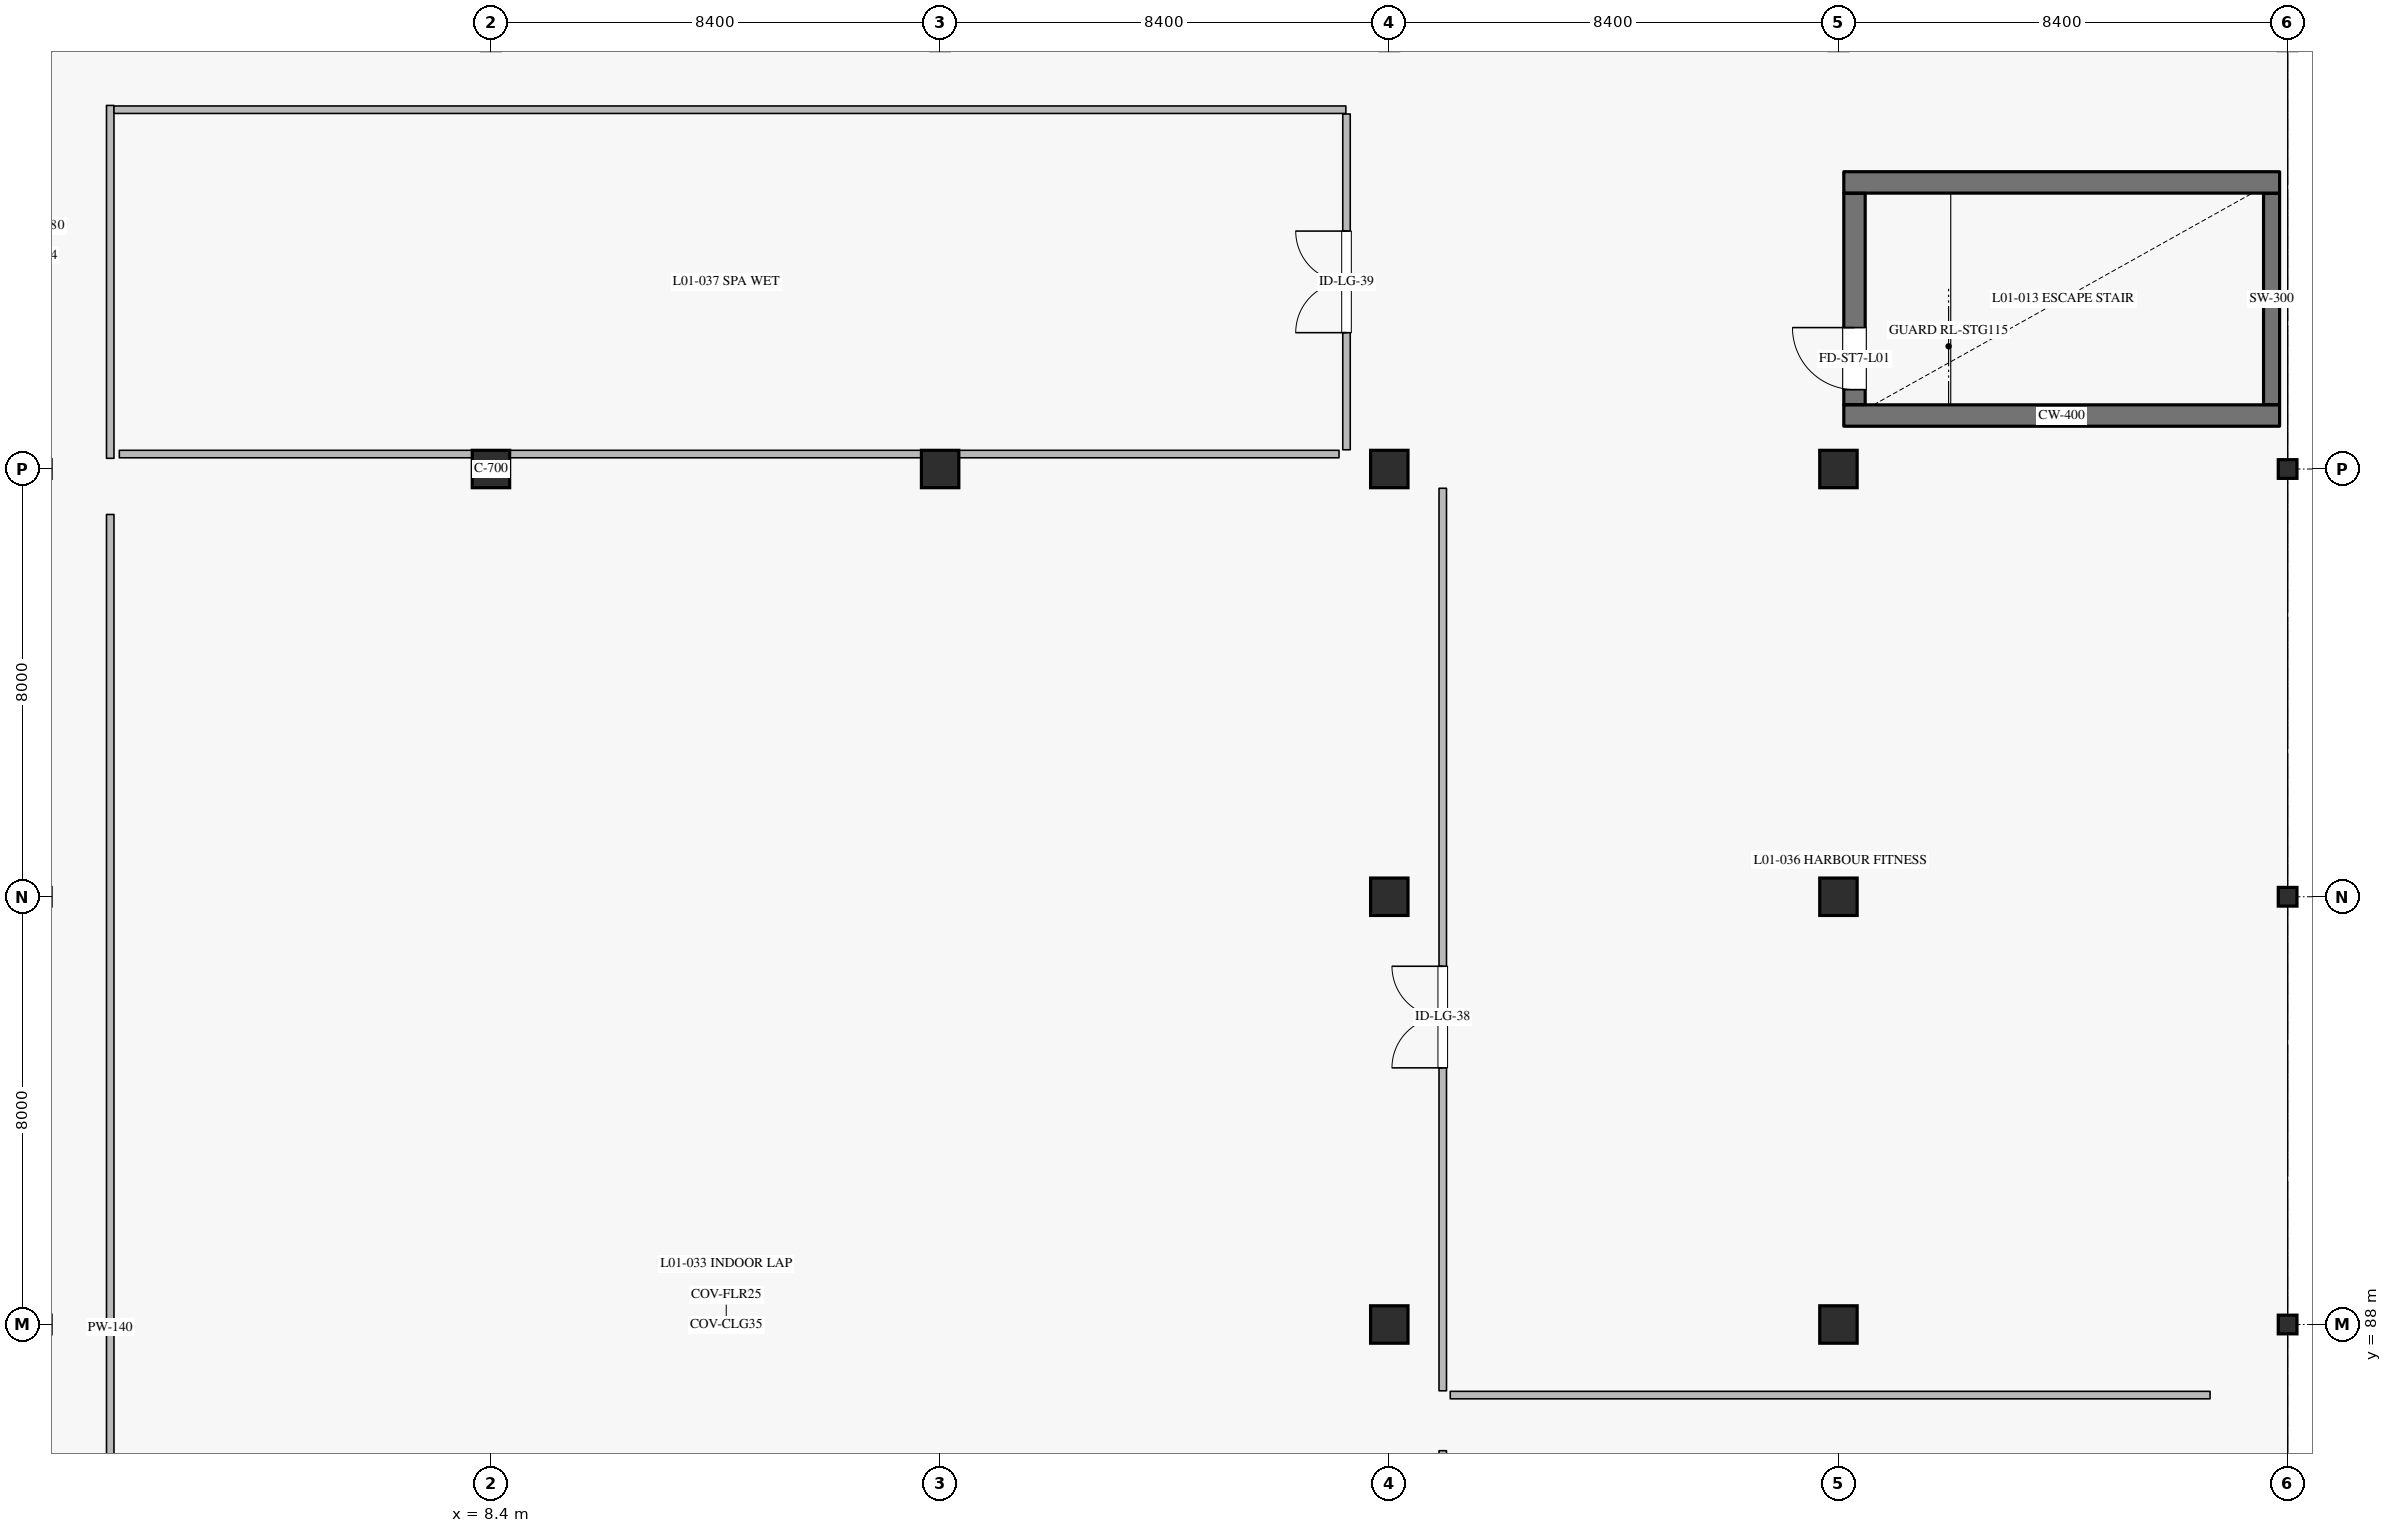
"""IFC4 building model, lengths in metres.
Left out: names, types, materials, properties, quantities, classifications, styles, units other than length and angle.
Written with IfcOpenShell. Run it as: python <this file> out.ifc"""

import sys

from ifc_helpers import new_model, si_unit, direction, frame, frame_2d, origin, origin_2d, place, context, subcontext, project, spatial, rectangle, hollow_rectangle, extrude, element, fill, save


model = new_model("IFC4")
c1 = context("Model", 3, precision=1e-05, world=origin(), true_north=direction((0.0, 1.0)))
c2 = subcontext(c1, "Body", "Model", "MODEL_VIEW")
j1 = project(units=[si_unit("LENGTHUNIT", "METRE"), si_unit("PLANEANGLEUNIT", "RADIAN")], contexts=[c1])
p1 = place(None, origin())
s1 = spatial("IfcSite", under=j1, at=p1, CompositionType="ELEMENT")
p2 = place(p1, origin())
s2 = spatial("IfcBuilding", under=s1, at=p2, CompositionType="ELEMENT")
p3 = place(p2, frame((0.0, 0.0, 6.0)))
s3 = spatial("IfcBuildingStorey", under=s2, at=p3, CompositionType="ELEMENT", Elevation=6.0)
for number, where, z_axis, x_axis in (
    (1, (8.4, 104.0, 0.0), (0.0, 0.0, 1.0), (1.0, 0.0, 0.0)),
    (2, (16.8, 104.0, 0.0), (0.0, 0.0, 1.0), (1.0, 0.0, 0.0)),
    (3, (25.2, 88.0, 0.0), (0.0, 0.0, 1.0), (1.0, 0.0, 0.0)),
    (4, (25.2, 96.0, 0.0), (0.0, 0.0, 1.0), (1.0, 0.0, 0.0)),
    (5, (25.2, 104.0, 0.0), (0.0, 0.0, 1.0), (1.0, 0.0, 0.0)),
    (6, (33.6, 88.0, 0.0), (0.0, 0.0, 1.0), (1.0, 0.0, 0.0)),
    (7, (33.6, 96.0, 0.0), (0.0, 0.0, 1.0), (1.0, 0.0, 0.0)),
    (8, (33.6, 104.0, 0.0), (0.0, 0.0, 1.0), (1.0, 0.0, 0.0)),
):
    element("IfcColumn", number, at=place(p3, frame(where, z_axis=z_axis, x_axis=x_axis)), inside=s3, PredefinedType="COLUMN", context=c2, shape_type="SweptSolid", body=[
        extrude(rectangle(XDim=0.7, YDim=0.7, at=origin_2d()), origin(), (0.0, 0.0, 1.0), 5.4),
    ])
for number, where, z_axis, x_axis in (
    (9, (42.0, 88.0, 0.0), (0.0, 0.0, 1.0), (1.0, 0.0, 0.0)),
    (10, (42.0, 96.0, 0.0), (0.0, 0.0, 1.0), (1.0, 0.0, 0.0)),
    (11, (42.0, 104.0, 0.0), (0.0, 0.0, 1.0), (1.0, 0.0, 0.0)),
):
    element("IfcColumn", number, at=place(p3, frame(where, z_axis=z_axis, x_axis=x_axis)), inside=s3, PredefinedType="COLUMN", context=c2, shape_type="SweptSolid", body=[
        extrude(hollow_rectangle(XDim=0.35, YDim=0.35, WallThickness=0.016, at=origin_2d()), origin(), (0.0, 0.0, 1.0), 5.4),
    ])
p4 = place(p3, frame((33.7, 105.0, 0.0), z_axis=(0.0, 0.0, 1.0), x_axis=(1.0, 0.0, 0.0)))
e12 = element("IfcWall", 12, at=p4, inside=s3, PredefinedType="SHEAR", context=c2, shape_type="SweptSolid", body=[
    extrude(rectangle(XDim=8.15, YDim=0.4, at=frame_2d((4.075, 0.0))), origin(), (0.0, 0.0, 1.0), 5.045),
])
p5 = place(p3, frame((41.7, 105.205, 0.0), z_axis=(0.0, 0.0, 1.0), x_axis=(0.0, 1.0, 0.0)))
e13 = element("IfcWall", 13, at=p5, inside=s3, PredefinedType="SHEAR", context=c2, shape_type="SweptSolid", body=[
    extrude(rectangle(XDim=3.95, YDim=0.3, at=frame_2d((1.975, 0.0))), origin(), (0.0, 0.0, 1.0), 5.045),
])
p6 = place(p3, frame((33.7, 109.36, 0.0), z_axis=(0.0, 0.0, 1.0), x_axis=(1.0, 0.0, 0.0)))
e14 = element("IfcWall", 14, at=p6, inside=s3, PredefinedType="SHEAR", context=c2, shape_type="SweptSolid", body=[
    extrude(rectangle(XDim=8.15, YDim=0.4, at=frame_2d((4.075, 0.0))), origin(), (0.0, 0.0, 1.0), 5.045),
])
p7 = place(p3, frame((33.9, 105.205, 0.0), z_axis=(0.0, 0.0, 1.0), x_axis=(0.0, 1.0, 0.0)))
e15 = element("IfcWall", 15, at=p7, inside=s3, PredefinedType="SHEAR", context=c2, shape_type="SweptSolid", body=[
    extrude(rectangle(XDim=3.95, YDim=0.4, at=frame_2d((1.975, 0.0))), origin(), (0.0, 0.0, 1.0), 5.045),
])
p8 = place(p7, frame((0.28, 0.0, 0.0)))
e16 = element("IfcOpeningElement", 16, at=p8, cuts=e15, PredefinedType="OPENING", context=c2, shape_type="SweptSolid", body=[
    extrude(rectangle(XDim=1.16, YDim=2.2, at=frame_2d((0.58, 1.1))), frame((0.0, 0.21, 0.0), z_axis=(0.0, -1.0, 0.0), x_axis=(1.0, 0.0, 0.0)), (0.0, 0.0, 1.0), 0.42),
])
p9 = place(p3, frame((1.28, 72.74, 0.0), z_axis=(0.0, 0.0, 1.0), x_axis=(0.0, 1.0, 0.0)))
e17 = element("IfcWall", 17, at=p9, inside=s3, PredefinedType="PARTITIONING", context=c2, shape_type="SweptSolid", body=[
    extrude(rectangle(XDim=30.41, YDim=0.14, at=frame_2d((15.205, 0.0))), origin(), (0.0, 0.0, 1.0), 5.045),
])
p10 = place(p3, frame((26.2, 65.16, 0.0), z_axis=(0.0, 0.0, 1.0), x_axis=(0.0, 1.0, 0.0)))
e18 = element("IfcWall", 18, at=p10, inside=s3, PredefinedType="PARTITIONING", context=c2, shape_type="SweptSolid", body=[
    extrude(rectangle(XDim=20.48, YDim=0.14, at=frame_2d((10.24, 0.0))), origin(), (0.0, 0.0, 1.0), 5.045),
])
p11 = place(p10, frame((9.29, 0.0, 0.0)))
e19 = element("IfcOpeningElement", 19, at=p11, cuts=e18, PredefinedType="OPENING", context=c2, shape_type="SweptSolid", body=[
    extrude(rectangle(XDim=1.9, YDim=2.4, at=frame_2d((0.95, 1.2))), frame((0.0, 0.08, 0.0), z_axis=(0.0, -1.0, 0.0), x_axis=(1.0, 0.0, 0.0)), (0.0, 0.0, 1.0), 0.16),
])
p12 = place(p3, frame((26.2, 86.76, 0.0), z_axis=(0.0, 0.0, 1.0), x_axis=(0.0, 1.0, 0.0)))
e20 = element("IfcWall", 20, at=p12, inside=s3, PredefinedType="PARTITIONING", context=c2, shape_type="SweptSolid", body=[
    extrude(rectangle(XDim=16.88, YDim=0.14, at=frame_2d((8.44, 0.0))), origin(), (0.0, 0.0, 1.0), 5.045),
])
p13 = place(p12, frame((6.04, 0.0, 0.0)))
e21 = element("IfcOpeningElement", 21, at=p13, cuts=e20, PredefinedType="OPENING", context=c2, shape_type="SweptSolid", body=[
    extrude(rectangle(XDim=1.9, YDim=2.4, at=frame_2d((0.95, 1.2))), frame((0.0, 0.08, 0.0), z_axis=(0.0, -1.0, 0.0), x_axis=(1.0, 0.0, 0.0)), (0.0, 0.0, 1.0), 0.16),
])
p14 = place(p3, frame((26.34, 86.68, 0.0), z_axis=(0.0, 0.0, 1.0), x_axis=(1.0, 0.0, 0.0)))
e22 = element("IfcWall", 22, at=p14, inside=s3, PredefinedType="PARTITIONING", context=c2, shape_type="SweptSolid", body=[
    extrude(rectangle(XDim=14.21, YDim=0.14, at=frame_2d((7.105, 0.0))), origin(), (0.0, 0.0, 1.0), 5.045),
])
p15 = place(p3, frame((24.4, 104.36, 0.0), z_axis=(0.0, 0.0, 1.0), x_axis=(0.0, 1.0, 0.0)))
e23 = element("IfcWall", 23, at=p15, inside=s3, PredefinedType="PARTITIONING", context=c2, shape_type="SweptSolid", body=[
    extrude(rectangle(XDim=6.28, YDim=0.14, at=frame_2d((3.14, 0.0))), origin(), (0.0, 0.0, 1.0), 5.045),
])
p16 = place(p15, frame((2.19, 0.0, 0.0)))
e24 = element("IfcOpeningElement", 24, at=p16, cuts=e23, PredefinedType="OPENING", context=c2, shape_type="SweptSolid", body=[
    extrude(rectangle(XDim=1.9, YDim=2.4, at=frame_2d((0.95, 1.2))), frame((0.0, 0.08, 0.0), z_axis=(0.0, -1.0, 0.0), x_axis=(1.0, 0.0, 0.0)), (0.0, 0.0, 1.0), 0.16),
])
p17 = place(p3, frame((1.45, 104.28, 0.0), z_axis=(0.0, 0.0, 1.0), x_axis=(1.0, 0.0, 0.0)))
e25 = element("IfcWall", 25, at=p17, inside=s3, PredefinedType="PARTITIONING", context=c2, shape_type="SweptSolid", body=[
    extrude(rectangle(XDim=22.81, YDim=0.14, at=frame_2d((11.405, 0.0))), origin(), (0.0, 0.0, 1.0), 5.045),
])
p18 = place(p3, frame((1.28, 104.2, 0.0), z_axis=(0.0, 0.0, 1.0), x_axis=(0.0, 1.0, 0.0)))
e26 = element("IfcWall", 26, at=p18, inside=s3, PredefinedType="PARTITIONING", context=c2, shape_type="SweptSolid", body=[
    extrude(rectangle(XDim=6.6, YDim=0.14, at=frame_2d((3.3, 0.0))), origin(), (0.0, 0.0, 1.0), 5.045),
])
p19 = place(p3, frame((1.35, 110.72, 0.0), z_axis=(0.0, 0.0, 1.0), x_axis=(1.0, 0.0, 0.0)))
e27 = element("IfcWall", 27, at=p19, inside=s3, PredefinedType="PARTITIONING", context=c2, shape_type="SweptSolid", body=[
    extrude(rectangle(XDim=23.038, YDim=0.14, at=frame_2d((11.519, 0.0))), origin(), (0.0, 0.0, 1.0), 5.045),
])
p20 = place(p8, origin())
e28 = element("IfcDoor", 28, at=p20, inside=s3, OperationType="SINGLE_SWING_RIGHT", PredefinedType="DOOR", context=c2, shape_type="SweptSolid", body=[
    extrude(rectangle(XDim=1.16, YDim=2.2, at=frame_2d((0.58, 1.1))), frame((0.0, 0.025, 0.0), z_axis=(0.0, -1.0, 0.0), x_axis=(1.0, 0.0, 0.0)), (0.0, 0.0, 1.0), 0.05),
])
fill(e16, e28)
p21 = place(p13, origin())
e29 = element("IfcDoor", 29, at=p21, inside=s3, OperationType="DOUBLE_DOOR_SINGLE_SWING", PredefinedType="DOOR", context=c2, shape_type="SweptSolid", body=[
    extrude(rectangle(XDim=1.9, YDim=2.4, at=frame_2d((0.95, 1.2))), frame((0.0, 0.025, 0.0), z_axis=(0.0, -1.0, 0.0), x_axis=(1.0, 0.0, 0.0)), (0.0, 0.0, 1.0), 0.05),
])
fill(e21, e29)
p22 = place(p16, origin())
e30 = element("IfcDoor", 30, at=p22, inside=s3, OperationType="DOUBLE_DOOR_SINGLE_SWING", PredefinedType="DOOR", context=c2, shape_type="SweptSolid", body=[
    extrude(rectangle(XDim=1.9, YDim=2.4, at=frame_2d((0.95, 1.2))), frame((0.0, 0.025, 0.0), z_axis=(0.0, -1.0, 0.0), x_axis=(1.0, 0.0, 0.0)), (0.0, 0.0, 1.0), 0.05),
])
fill(e24, e30)
save(model, sys.argv[1])
